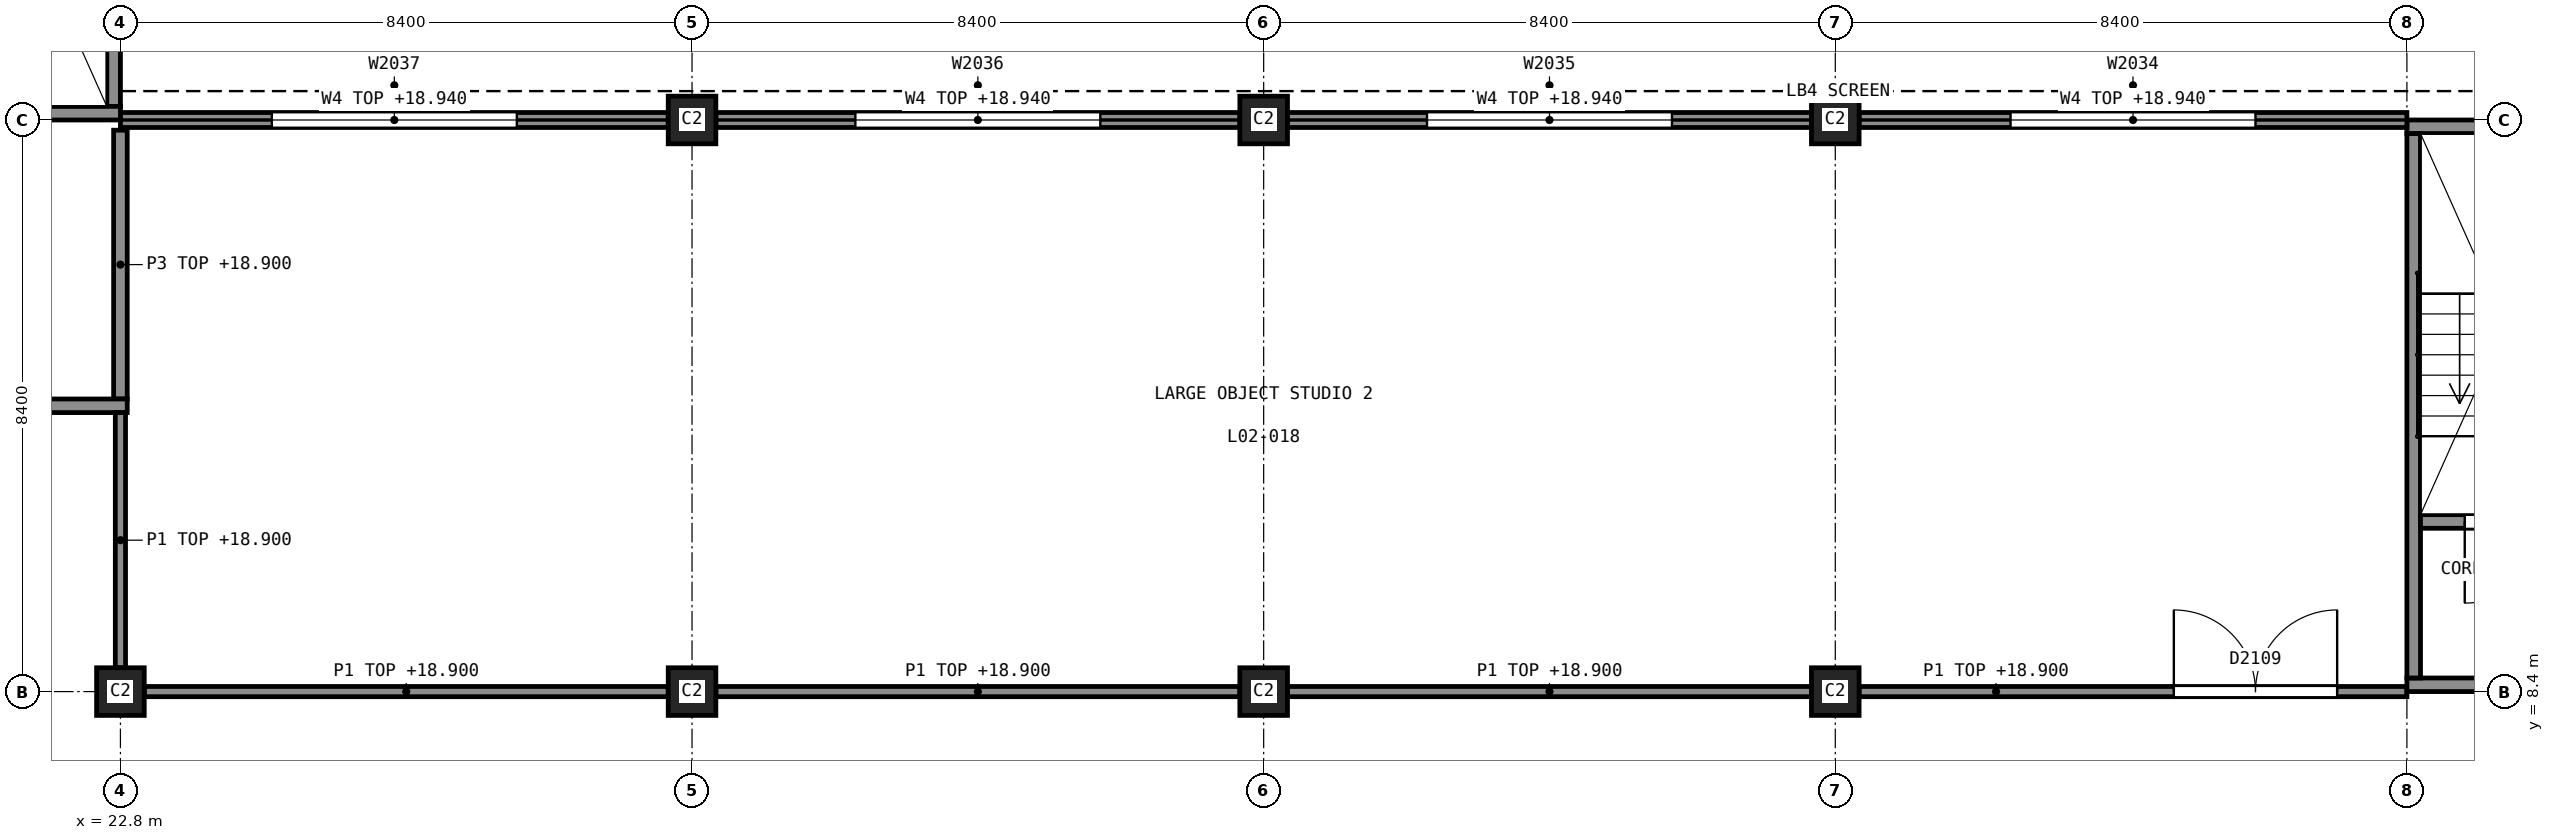
"""IFC4 building model, lengths in metres.
Left out: names, types, materials, properties, quantities, classifications, styles, units other than length and angle.
Written with IfcOpenShell. Run it as: python <this file> out.ifc"""

import sys

from ifc_helpers import new_model, si_unit, direction, frame, frame_2d, origin, origin_2d, place, context, subcontext, project, spatial, rectangle, extrude, element, fill, save


model = new_model("IFC4")
c1 = context("Model", 3, precision=1e-05, world=origin(), true_north=direction((0.0, 1.0)))
c2 = subcontext(c1, "Body", "Model", "MODEL_VIEW")
j1 = project(units=[si_unit("LENGTHUNIT", "METRE"), si_unit("PLANEANGLEUNIT", "RADIAN")], contexts=[c1])
p1 = place(None, origin())
s1 = spatial("IfcSite", under=j1, at=p1, CompositionType="ELEMENT")
p2 = place(p1, origin())
s2 = spatial("IfcBuilding", under=s1, at=p2, CompositionType="ELEMENT")
p3 = place(p2, frame((0.0, 0.0, 10.5)))
s3 = spatial("IfcBuildingStorey", under=s2, at=p3, CompositionType="ELEMENT", Elevation=10.5)
p4 = place(p3, frame((14.4, 16.9, 0.0), z_axis=(0.0, 0.0, 1.0), x_axis=(1.0, 0.0, 0.0)))
e1 = element("IfcWall", 1, at=p4, inside=s3, PredefinedType="SHEAR", context=c2, shape_type="SweptSolid", body=[
    extrude(rectangle(XDim=8.4, YDim=0.2, at=frame_2d((4.2, 0.0))), origin(), (0.0, 0.0, 1.0), 9.5),
])
p5 = place(p3, frame((22.7, 17.0, 0.0), z_axis=(0.0, 0.0, 1.0), x_axis=(0.0, 1.0, 0.0)))
e2 = element("IfcWall", 2, at=p5, inside=s3, PredefinedType="SHEAR", context=c2, shape_type="SweptSolid", body=[
    extrude(rectangle(XDim=8.0, YDim=0.2, at=frame_2d((4.0, 0.0))), origin(), (0.0, 0.0, 1.0), 9.5),
])
p6 = place(p3, frame((56.4, 8.5, 0.0), z_axis=(0.0, 0.0, 1.0), x_axis=(1.0, 0.0, 0.0)))
e3 = element("IfcWall", 3, at=p6, inside=s3, PredefinedType="SHEAR", context=c2, shape_type="SweptSolid", body=[
    extrude(rectangle(XDim=8.4, YDim=0.2, at=frame_2d((4.2, 0.0))), origin(), (0.0, 0.0, 1.0), 9.5),
])
p7 = place(p6, frame((3.3, 0.0, 0.0)))
e4 = element("IfcOpeningElement", 4, at=p7, cuts=e3, PredefinedType="OPENING", context=c2, shape_type="SweptSolid", body=[
    extrude(rectangle(XDim=1.8, YDim=2.1, at=frame_2d((0.9, 1.05))), frame((0.0, 0.11, 0.0), z_axis=(0.0, -1.0, 0.0), x_axis=(1.0, 0.0, 0.0)), (0.0, 0.0, 1.0), 0.22),
])
p8 = place(p3, frame((56.4, 16.7, 0.0), z_axis=(0.0, 0.0, 1.0), x_axis=(1.0, 0.0, 0.0)))
e5 = element("IfcWall", 5, at=p8, inside=s3, PredefinedType="SHEAR", context=c2, shape_type="SweptSolid", body=[
    extrude(rectangle(XDim=8.4, YDim=0.2, at=frame_2d((4.2, 0.0))), origin(), (0.0, 0.0, 1.0), 9.5),
])
p9 = place(p3, frame((56.5, 8.6, 0.0), z_axis=(0.0, 0.0, 1.0), x_axis=(0.0, 1.0, 0.0)))
e6 = element("IfcWall", 6, at=p9, inside=s3, PredefinedType="SHEAR", context=c2, shape_type="SweptSolid", body=[
    extrude(rectangle(XDim=8.0, YDim=0.2, at=frame_2d((4.0, 0.0))), origin(), (0.0, 0.0, 1.0), 9.5),
])
p10 = place(p3, frame((56.6, 10.9, 0.0), z_axis=(0.0, 0.0, 1.0), x_axis=(1.0, 0.0, 0.0)))
e7 = element("IfcWall", 7, at=p10, inside=s3, PredefinedType="SHEAR", context=c2, shape_type="SweptSolid", body=[
    extrude(rectangle(XDim=8.0, YDim=0.2, at=frame_2d((4.0, 0.0))), origin(), (0.0, 0.0, 1.0), 9.5),
])
p11 = place(p10, frame((0.65, 0.0, 0.0)))
e8 = element("IfcOpeningElement", 8, at=p11, cuts=e7, PredefinedType="OPENING", context=c2, shape_type="SweptSolid", body=[
    extrude(rectangle(XDim=1.2, YDim=2.1, at=frame_2d((0.6, 1.05))), frame((0.0, 0.11, 0.0), z_axis=(0.0, -1.0, 0.0), x_axis=(1.0, 0.0, 0.0)), (0.0, 0.0, 1.0), 0.22),
])
p12 = place(p10, frame((6.15, 0.0, 0.0)))
e9 = element("IfcOpeningElement", 9, at=p12, cuts=e7, PredefinedType="OPENING", context=c2, shape_type="SweptSolid", body=[
    extrude(rectangle(XDim=1.2, YDim=2.1, at=frame_2d((0.6, 1.05))), frame((0.0, 0.11, 0.0), z_axis=(0.0, -1.0, 0.0), x_axis=(1.0, 0.0, 0.0)), (0.0, 0.0, 1.0), 0.22),
])
p13 = place(p10, frame((3.45, 0.0, 0.0)))
e10 = element("IfcOpeningElement", 10, at=p13, cuts=e7, PredefinedType="OPENING", context=c2, shape_type="SweptSolid", body=[
    extrude(rectangle(XDim=1.1, YDim=2.1, at=frame_2d((0.55, 1.05))), frame((0.0, 0.11, 0.0), z_axis=(0.0, -1.0, 0.0), x_axis=(1.0, 0.0, 0.0)), (0.0, 0.0, 1.0), 0.22),
])
for number, where, z_axis, x_axis in (
    (11, (22.8, 8.4, 0.0), (0.0, 0.0, 1.0), (1.0, 0.0, 0.0)),
    (12, (31.2, 8.4, 0.0), (0.0, 0.0, 1.0), (1.0, 0.0, 0.0)),
    (13, (31.2, 16.8, 0.0), (0.0, 0.0, 1.0), (1.0, 0.0, 0.0)),
    (14, (39.6, 8.4, 0.0), (0.0, 0.0, 1.0), (1.0, 0.0, 0.0)),
    (15, (39.6, 16.8, 0.0), (0.0, 0.0, 1.0), (1.0, 0.0, 0.0)),
    (16, (48.0, 8.4, 0.0), (0.0, 0.0, 1.0), (1.0, 0.0, 0.0)),
    (17, (48.0, 16.8, 0.0), (0.0, 0.0, 1.0), (1.0, 0.0, 0.0)),
):
    element("IfcColumn", number, at=place(p3, frame(where, z_axis=z_axis, x_axis=x_axis)), inside=s3, PredefinedType="COLUMN", context=c2, shape_type="SweptSolid", body=[
        extrude(rectangle(XDim=0.7, YDim=0.7, at=origin_2d()), origin(), (0.0, 0.0, 1.0), 9.5),
    ])
p14 = place(p3, frame((48.35, 16.8, 0.0), z_axis=(0.0, 0.0, 1.0), x_axis=(1.0, 0.0, 0.0)))
e18 = element("IfcWall", 18, at=p14, inside=s3, PredefinedType="SOLIDWALL", context=c2, shape_type="SweptSolid", body=[
    extrude(rectangle(XDim=8.05, YDim=0.22, at=frame_2d((4.025, 0.0))), origin(), (0.0, 0.0, 1.0), 8.44),
])
p15 = place(p14, frame((2.225, 0.0, 0.9)))
e19 = element("IfcOpeningElement", 19, at=p15, cuts=e18, PredefinedType="OPENING", context=c2, shape_type="SweptSolid", body=[
    extrude(rectangle(XDim=3.6, YDim=1.5, at=frame_2d((1.8, 0.75))), frame((0.0, 0.12, 0.0), z_axis=(0.0, -1.0, 0.0), x_axis=(1.0, 0.0, 0.0)), (0.0, 0.0, 1.0), 0.24),
])
p16 = place(p3, frame((39.95, 16.8, 0.0), z_axis=(0.0, 0.0, 1.0), x_axis=(1.0, 0.0, 0.0)))
e20 = element("IfcWall", 20, at=p16, inside=s3, PredefinedType="SOLIDWALL", context=c2, shape_type="SweptSolid", body=[
    extrude(rectangle(XDim=7.7, YDim=0.22, at=frame_2d((3.85, 0.0))), origin(), (0.0, 0.0, 1.0), 8.44),
])
p17 = place(p16, frame((2.05, 0.0, 0.9)))
e21 = element("IfcOpeningElement", 21, at=p17, cuts=e20, PredefinedType="OPENING", context=c2, shape_type="SweptSolid", body=[
    extrude(rectangle(XDim=3.6, YDim=1.5, at=frame_2d((1.8, 0.75))), frame((0.0, 0.12, 0.0), z_axis=(0.0, -1.0, 0.0), x_axis=(1.0, 0.0, 0.0)), (0.0, 0.0, 1.0), 0.24),
])
p18 = place(p3, frame((31.55, 16.8, 0.0), z_axis=(0.0, 0.0, 1.0), x_axis=(1.0, 0.0, 0.0)))
e22 = element("IfcWall", 22, at=p18, inside=s3, PredefinedType="SOLIDWALL", context=c2, shape_type="SweptSolid", body=[
    extrude(rectangle(XDim=7.7, YDim=0.22, at=frame_2d((3.85, 0.0))), origin(), (0.0, 0.0, 1.0), 8.44),
])
p19 = place(p18, frame((2.05, 0.0, 0.9)))
e23 = element("IfcOpeningElement", 23, at=p19, cuts=e22, PredefinedType="OPENING", context=c2, shape_type="SweptSolid", body=[
    extrude(rectangle(XDim=3.6, YDim=1.5, at=frame_2d((1.8, 0.75))), frame((0.0, 0.12, 0.0), z_axis=(0.0, -1.0, 0.0), x_axis=(1.0, 0.0, 0.0)), (0.0, 0.0, 1.0), 0.24),
])
p20 = place(p3, frame((22.8, 16.8, 0.0), z_axis=(0.0, 0.0, 1.0), x_axis=(1.0, 0.0, 0.0)))
e24 = element("IfcWall", 24, at=p20, inside=s3, PredefinedType="SOLIDWALL", context=c2, shape_type="SweptSolid", body=[
    extrude(rectangle(XDim=8.05, YDim=0.22, at=frame_2d((4.025, 0.0))), origin(), (0.0, 0.0, 1.0), 8.44),
])
p21 = place(p20, frame((2.225, 0.0, 0.9)))
e25 = element("IfcOpeningElement", 25, at=p21, cuts=e24, PredefinedType="OPENING", context=c2, shape_type="SweptSolid", body=[
    extrude(rectangle(XDim=3.6, YDim=1.5, at=frame_2d((1.8, 0.75))), frame((0.0, 0.12, 0.0), z_axis=(0.0, -1.0, 0.0), x_axis=(1.0, 0.0, 0.0)), (0.0, 0.0, 1.0), 0.24),
])
p22 = place(p3, frame((22.8, 12.7, 0.0), z_axis=(0.0, 0.0, 1.0), x_axis=(0.0, 1.0, 0.0)))
e26 = element("IfcWall", 26, at=p22, inside=s3, PredefinedType="PARTITIONING", context=c2, shape_type="SweptSolid", body=[
    extrude(rectangle(XDim=3.95, YDim=0.2, at=frame_2d((1.975, 0.0))), origin(), (0.0, 0.0, 1.0), 8.4),
])
p23 = place(p3, frame((14.4, 12.6, 0.0), z_axis=(0.0, 0.0, 1.0), x_axis=(1.0, 0.0, 0.0)))
e27 = element("IfcWall", 27, at=p23, inside=s3, PredefinedType="PARTITIONING", context=c2, shape_type="SweptSolid", body=[
    extrude(rectangle(XDim=8.5, YDim=0.2, at=frame_2d((4.25, 0.0))), origin(), (0.0, 0.0, 1.0), 8.4),
])
p24 = place(p23, frame((1.775, 0.0, 0.0)))
e28 = element("IfcOpeningElement", 28, at=p24, cuts=e27, PredefinedType="OPENING", context=c2, shape_type="SweptSolid", body=[
    extrude(rectangle(XDim=1.0, YDim=2.1, at=frame_2d((0.5, 1.05))), frame((0.0, 0.11, 0.0), z_axis=(0.0, -1.0, 0.0), x_axis=(1.0, 0.0, 0.0)), (0.0, 0.0, 1.0), 0.22),
])
p25 = place(p3, frame((23.15, 8.4, 0.0), z_axis=(0.0, 0.0, 1.0), x_axis=(1.0, 0.0, 0.0)))
e29 = element("IfcWall", 29, at=p25, inside=s3, PredefinedType="PARTITIONING", context=c2, shape_type="SweptSolid", body=[
    extrude(rectangle(XDim=7.7, YDim=0.15, at=frame_2d((3.85, 0.0))), origin(), (0.0, 0.0, 1.0), 8.4),
])
for number, where, z_axis, x_axis in (
    (30, (31.55, 8.4, 0.0), (0.0, 0.0, 1.0), (1.0, 0.0, 0.0)),
    (31, (39.95, 8.4, 0.0), (0.0, 0.0, 1.0), (1.0, 0.0, 0.0)),
):
    element("IfcWall", number, at=place(p3, frame(where, z_axis=z_axis, x_axis=x_axis)), inside=s3, PredefinedType="PARTITIONING", context=c2, shape_type="SweptSolid", body=[
        extrude(rectangle(XDim=7.7, YDim=0.15, at=frame_2d((3.85, 0.0))), origin(), (0.0, 0.0, 1.0), 8.4),
    ])
p26 = place(p3, frame((48.35, 8.4, 0.0), z_axis=(0.0, 0.0, 1.0), x_axis=(1.0, 0.0, 0.0)))
e32 = element("IfcWall", 32, at=p26, inside=s3, PredefinedType="PARTITIONING", context=c2, shape_type="SweptSolid", body=[
    extrude(rectangle(XDim=8.05, YDim=0.15, at=frame_2d((4.025, 0.0))), origin(), (0.0, 0.0, 1.0), 8.4),
])
p27 = place(p26, frame((4.625, 0.0, 0.0)))
e33 = element("IfcOpeningElement", 33, at=p27, cuts=e32, PredefinedType="OPENING", context=c2, shape_type="SweptSolid", body=[
    extrude(rectangle(XDim=2.4, YDim=2.4, at=frame_2d((1.2, 1.2))), frame((0.0, 0.085, 0.0), z_axis=(0.0, -1.0, 0.0), x_axis=(1.0, 0.0, 0.0)), (0.0, 0.0, 1.0), 0.17),
])
p28 = place(p3, frame((22.8, 8.75, 0.0), z_axis=(0.0, 0.0, 1.0), x_axis=(0.0, 1.0, 0.0)))
e34 = element("IfcWall", 34, at=p28, inside=s3, PredefinedType="PARTITIONING", context=c2, shape_type="SweptSolid", body=[
    extrude(rectangle(XDim=3.75, YDim=0.15, at=frame_2d((1.875, 0.0))), origin(), (0.0, 0.0, 1.0), 8.4),
])
p29 = place(p15, origin())
e35 = element("IfcWindow", 35, at=p29, inside=s3, PartitioningType="DOUBLE_PANEL_VERTICAL", PredefinedType="WINDOW", context=c2, shape_type="SweptSolid", body=[
    extrude(rectangle(XDim=3.6, YDim=1.5, at=frame_2d((1.8, 0.75))), frame((0.0, -0.03, 0.0), z_axis=(0.0, -1.0, 0.0), x_axis=(1.0, 0.0, 0.0)), (0.0, 0.0, 1.0), 0.06),
])
fill(e19, e35)
p30 = place(p17, origin())
e36 = element("IfcWindow", 36, at=p30, inside=s3, PartitioningType="DOUBLE_PANEL_VERTICAL", PredefinedType="WINDOW", context=c2, shape_type="SweptSolid", body=[
    extrude(rectangle(XDim=3.6, YDim=1.5, at=frame_2d((1.8, 0.75))), frame((0.0, -0.03, 0.0), z_axis=(0.0, -1.0, 0.0), x_axis=(1.0, 0.0, 0.0)), (0.0, 0.0, 1.0), 0.06),
])
fill(e21, e36)
p31 = place(p19, origin())
e37 = element("IfcWindow", 37, at=p31, inside=s3, PartitioningType="DOUBLE_PANEL_VERTICAL", PredefinedType="WINDOW", context=c2, shape_type="SweptSolid", body=[
    extrude(rectangle(XDim=3.6, YDim=1.5, at=frame_2d((1.8, 0.75))), frame((0.0, -0.03, 0.0), z_axis=(0.0, -1.0, 0.0), x_axis=(1.0, 0.0, 0.0)), (0.0, 0.0, 1.0), 0.06),
])
fill(e23, e37)
p32 = place(p21, origin())
e38 = element("IfcWindow", 38, at=p32, inside=s3, PartitioningType="DOUBLE_PANEL_VERTICAL", PredefinedType="WINDOW", context=c2, shape_type="SweptSolid", body=[
    extrude(rectangle(XDim=3.6, YDim=1.5, at=frame_2d((1.8, 0.75))), frame((0.0, -0.03, 0.0), z_axis=(0.0, -1.0, 0.0), x_axis=(1.0, 0.0, 0.0)), (0.0, 0.0, 1.0), 0.06),
])
fill(e25, e38)
p33 = place(p27, origin())
e39 = element("IfcDoor", 39, at=p33, inside=s3, OperationType="DOUBLE_DOOR_SINGLE_SWING", PredefinedType="DOOR", context=c2, shape_type="SweptSolid", body=[
    extrude(rectangle(XDim=2.4, YDim=2.4, at=frame_2d((1.2, 1.2))), frame((0.0, 0.025, 0.0), z_axis=(0.0, -1.0, 0.0), x_axis=(1.0, 0.0, 0.0)), (0.0, 0.0, 1.0), 0.05),
])
fill(e33, e39)
p34 = place(p11, origin())
e40 = element("IfcDoor", 40, at=p34, inside=s3, OperationType="SINGLE_SWING_LEFT", PredefinedType="DOOR", context=c2, shape_type="SweptSolid", body=[
    extrude(rectangle(XDim=1.2, YDim=2.1, at=frame_2d((0.6, 1.05))), frame((0.0, 0.025, 0.0), z_axis=(0.0, -1.0, 0.0), x_axis=(1.0, 0.0, 0.0)), (0.0, 0.0, 1.0), 0.05),
])
fill(e8, e40)
save(model, sys.argv[1])
